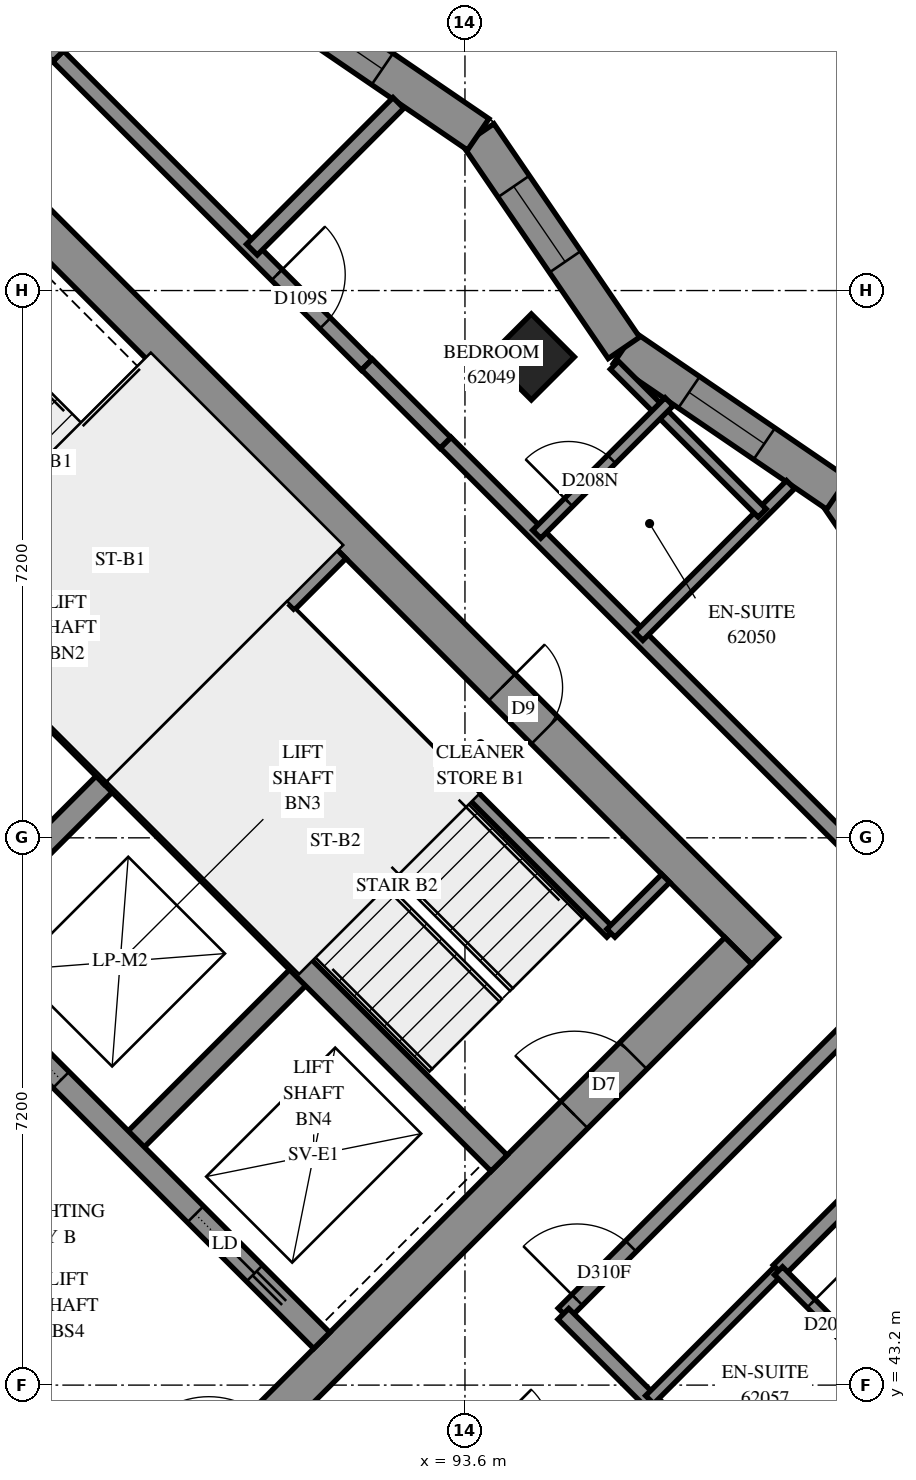
"""IFC4 building model, lengths in metres.
Left out: names, types, materials, properties, quantities, classifications, styles, units other than length and angle.
Written with IfcOpenShell. Run it as: python <this file> out.ifc"""

import sys

from ifc_helpers import new_model, si_unit, direction, frame, frame_2d, origin, origin_2d, place, context, subcontext, project, spatial, polyline, rectangle, outline, extrude, element, fill, save


model = new_model("IFC4")
c1 = context("Model", 3, precision=1e-05, world=origin(), true_north=direction((0.0, 1.0)))
c2 = subcontext(c1, "Body", "Model", "MODEL_VIEW")
j1 = project(units=[si_unit("LENGTHUNIT", "METRE"), si_unit("PLANEANGLEUNIT", "RADIAN")], contexts=[c1])
p1 = place(None, origin())
s1 = spatial("IfcSite", under=j1, at=p1, CompositionType="ELEMENT")
p2 = place(p1, origin())
s2 = spatial("IfcBuilding", under=s1, at=p2, CompositionType="ELEMENT")
p3 = place(p2, frame((0.0, 0.0, 227.0)))
s3 = spatial("IfcBuildingStorey", under=s2, at=p3, CompositionType="ELEMENT", Elevation=227.0)
p4 = place(p3, frame((94.474, 56.727, 0.0), z_axis=(0.0, 0.0, 1.0), x_axis=(0.7071067812, -0.7071067812, 0.0)))
e1 = element("IfcColumn", 1, at=p4, inside=s3, PredefinedType="COLUMN", context=c2, shape_type="SweptSolid", body=[
    extrude(rectangle(XDim=0.8, YDim=0.8, at=origin_2d()), origin(), (0.0, 0.0, 1.0), 3.1),
])
p5 = place(p3, frame((86.66, 59.802, -0.3), z_axis=(0.0, 0.0, 1.0), x_axis=(0.7071067812, -0.7071067812, 0.0)))
e2 = element("IfcWall", 2, at=p5, inside=s3, PredefinedType="SHEAR", context=c2, shape_type="SweptSolid", body=[
    extrude(rectangle(XDim=15.4, YDim=0.5, at=frame_2d((7.7, 0.0))), origin(), (0.0, 0.0, 1.0), 2.7),
])
p6 = place(p5, frame((10.5, 0.0, 0.3)))
e3 = element("IfcOpeningElement", 3, at=p6, cuts=e2, PredefinedType="OPENING", context=c2, shape_type="SweptSolid", body=[
    extrude(rectangle(XDim=0.8, YDim=2.1, at=frame_2d((0.4, 1.05))), frame((0.0, 0.26, 0.0), z_axis=(0.0, -1.0, 0.0), x_axis=(1.0, 0.0, 0.0)), (0.0, 0.0, 1.0), 0.52),
])
p7 = place(p3, frame((87.013, 38.731, -0.3), z_axis=(0.0, 0.0, 1.0), x_axis=(0.7071067812, 0.7071067812, 0.0)))
e4 = element("IfcWall", 4, at=p7, inside=s3, PredefinedType="SHEAR", context=c2, shape_type="SweptSolid", body=[
    extrude(rectangle(XDim=14.4, YDim=0.5, at=frame_2d((7.2, 0.0))), origin(), (0.0, 0.0, 1.0), 2.7),
])
p8 = place(p7, frame((4.55, 0.0, 0.3)))
e5 = element("IfcOpeningElement", 5, at=p8, cuts=e4, PredefinedType="OPENING", context=c2, shape_type="SweptSolid", body=[
    extrude(rectangle(XDim=1.1, YDim=2.1, at=frame_2d((0.55, 1.05))), frame((0.0, 0.26, 0.0), z_axis=(0.0, -1.0, 0.0), x_axis=(1.0, 0.0, 0.0)), (0.0, 0.0, 1.0), 0.52),
])
p9 = place(p7, frame((11.35, 0.0, 0.3)))
e6 = element("IfcOpeningElement", 6, at=p9, cuts=e4, PredefinedType="OPENING", context=c2, shape_type="SweptSolid", body=[
    extrude(rectangle(XDim=1.1, YDim=2.1, at=frame_2d((0.55, 1.05))), frame((0.0, 0.26, 0.0), z_axis=(0.0, -1.0, 0.0), x_axis=(1.0, 0.0, 0.0)), (0.0, 0.0, 1.0), 0.52),
])
for number, where, z_axis, x_axis in (
    (7, (86.625, 48.878, 0.0), (0.0, 0.0, 1.0), (0.707, 0.707, 0.0)),
    (8, (89.17, 46.332, 0.0), (0.0, 0.0, 1.0), (0.707, 0.707, 0.0)),
):
    element("IfcWall", number, at=place(p3, frame(where, z_axis=z_axis, x_axis=x_axis)), inside=s3, PredefinedType="SOLIDWALL", context=c2, shape_type="SweptSolid", body=[
        extrude(rectangle(XDim=3.3, YDim=0.3, at=frame_2d((1.65, 0.0))), origin(), (0.0, 0.0, 1.0), 3.1),
    ])
p10 = place(p3, frame((78.988, 51.423, 0.0), z_axis=(0.0, 0.0, 1.0), x_axis=(0.7071067812, -0.7071067812, 0.0)))
e9 = element("IfcWall", 9, at=p10, inside=s3, PredefinedType="SOLIDWALL", context=c2, shape_type="SweptSolid", body=[
    extrude(rectangle(XDim=14.4, YDim=0.3, at=frame_2d((7.2, 0.0))), origin(), (0.0, 0.0, 1.0), 3.1),
])
p11 = place(p10, frame((1.35, 0.0, 0.0)))
e10 = element("IfcOpeningElement", 10, at=p11, cuts=e9, PredefinedType="OPENING", context=c2, shape_type="SweptSolid", body=[
    extrude(rectangle(XDim=0.9, YDim=2.1, at=frame_2d((0.45, 1.05))), frame((0.0, 0.16, 0.0), z_axis=(0.0, -1.0, 0.0), x_axis=(1.0, 0.0, 0.0)), (0.0, 0.0, 1.0), 0.32),
])
p12 = place(p10, frame((4.95, 0.0, 0.0)))
e11 = element("IfcOpeningElement", 11, at=p12, cuts=e9, PredefinedType="OPENING", context=c2, shape_type="SweptSolid", body=[
    extrude(rectangle(XDim=0.9, YDim=2.1, at=frame_2d((0.45, 1.05))), frame((0.0, 0.16, 0.0), z_axis=(0.0, -1.0, 0.0), x_axis=(1.0, 0.0, 0.0)), (0.0, 0.0, 1.0), 0.32),
])
p13 = place(p10, frame((8.55, 0.0, 0.0)))
e12 = element("IfcOpeningElement", 12, at=p13, cuts=e9, PredefinedType="OPENING", context=c2, shape_type="SweptSolid", body=[
    extrude(rectangle(XDim=0.9, YDim=2.1, at=frame_2d((0.45, 1.05))), frame((0.0, 0.16, 0.0), z_axis=(0.0, -1.0, 0.0), x_axis=(1.0, 0.0, 0.0)), (0.0, 0.0, 1.0), 0.32),
])
p14 = place(p10, frame((12.05, 0.0, 0.0)))
e13 = element("IfcOpeningElement", 13, at=p14, cuts=e9, PredefinedType="OPENING", context=c2, shape_type="SweptSolid", body=[
    extrude(rectangle(XDim=1.1, YDim=2.1, at=frame_2d((0.55, 1.05))), frame((0.0, 0.16, 0.0), z_axis=(0.0, -1.0, 0.0), x_axis=(1.0, 0.0, 0.0)), (0.0, 0.0, 1.0), 0.32),
])
p15 = place(p3, frame((81.534, 53.969, 0.0), z_axis=(0.0, 0.0, 1.0), x_axis=(0.707103309, -0.7071102534, 0.0)))
e14 = element("IfcWall", 14, at=p15, inside=s3, PredefinedType="SOLIDWALL", context=c2, shape_type="SweptSolid", body=[
    extrude(rectangle(XDim=14.4, YDim=0.3, at=frame_2d((7.2, 0.0))), origin(), (0.0, 0.0, 1.0), 3.1),
])
p16 = place(p15, frame((1.25, 0.0, 0.0)))
e15 = element("IfcOpeningElement", 15, at=p16, cuts=e14, PredefinedType="OPENING", context=c2, shape_type="SweptSolid", body=[
    extrude(rectangle(XDim=1.1, YDim=2.1, at=frame_2d((0.55, 1.05))), frame((0.0, 0.16, 0.0), z_axis=(0.0, -1.0, 0.0), x_axis=(1.0, 0.0, 0.0)), (0.0, 0.0, 1.0), 0.32),
])
p17 = place(p15, frame((4.85, 0.0, 0.0)))
e16 = element("IfcOpeningElement", 16, at=p17, cuts=e14, PredefinedType="OPENING", context=c2, shape_type="SweptSolid", body=[
    extrude(rectangle(XDim=1.1, YDim=2.1, at=frame_2d((0.55, 1.05))), frame((0.0, 0.16, 0.0), z_axis=(0.0, -1.0, 0.0), x_axis=(1.0, 0.0, 0.0)), (0.0, 0.0, 1.0), 0.32),
])
p18 = place(p15, frame((8.45, 0.0, 0.0)))
e17 = element("IfcOpeningElement", 17, at=p18, cuts=e14, PredefinedType="OPENING", context=c2, shape_type="SweptSolid", body=[
    extrude(rectangle(XDim=1.1, YDim=2.1, at=frame_2d((0.55, 1.05))), frame((0.0, 0.16, 0.0), z_axis=(0.0, -1.0, 0.0), x_axis=(1.0, 0.0, 0.0)), (0.0, 0.0, 1.0), 0.32),
])
p19 = place(p15, frame((12.05, 0.0, 0.0)))
e18 = element("IfcOpeningElement", 18, at=p19, cuts=e14, PredefinedType="OPENING", context=c2, shape_type="SweptSolid", body=[
    extrude(rectangle(XDim=1.1, YDim=2.1, at=frame_2d((0.55, 1.05))), frame((0.0, 0.16, 0.0), z_axis=(0.0, -1.0, 0.0), x_axis=(1.0, 0.0, 0.0)), (0.0, 0.0, 1.0), 0.32),
])
for number, where, z_axis, x_axis in (
    (19, (83.867, 56.302, 0.0), (0.0, 0.0, 1.0), (0.707, -0.707, 0.0)),
    (20, (88.958, 51.211, 0.0), (0.0, 0.0, 1.0), (0.707, -0.707, 0.0)),
):
    element("IfcWall", number, at=place(p3, frame(where, z_axis=z_axis, x_axis=x_axis)), inside=s3, PredefinedType="SOLIDWALL", context=c2, shape_type="SweptSolid", body=[
        extrude(rectangle(XDim=7.2, YDim=0.3, at=frame_2d((3.6, 0.0))), origin(), (0.0, 0.0, 1.0), 3.1),
    ])
p20 = place(p3, frame((88.958, 51.211, 0.0), z_axis=(0.0, 0.0, 1.0), x_axis=(0.7071067812, 0.7071067812, 0.0)))
e21 = element("IfcWall", 21, at=p20, inside=s3, PredefinedType="SOLIDWALL", context=c2, shape_type="SweptSolid", body=[
    extrude(rectangle(XDim=4.2, YDim=0.3, at=frame_2d((2.1, 0.0))), origin(), (0.0, 0.0, 1.0), 3.1),
])
p21 = place(p3, frame((100.429, 52.103, 0.0), z_axis=(0.0, 0.0, 1.0), x_axis=(-0.563838178, 0.8258852881, 0.0)))
e22 = element("IfcWall", 22, at=p21, inside=s3, PredefinedType="SOLIDWALL", context=c2, shape_type="SweptSolid", body=[
    extrude(outline(polyline([(0.069, -0.25), (3.469, -0.25), (3.375, 0.25), (-0.069, 0.25), (0.069, -0.25)])), origin(), (0.0, 0.0, 1.0), 3.1),
])
p22 = place(p21, frame((1.087, 0.0, 0.45)))
e23 = element("IfcOpeningElement", 23, at=p22, cuts=e22, PredefinedType="OPENING", context=c2, shape_type="SweptSolid", body=[
    extrude(rectangle(XDim=1.2, YDim=2.5, at=frame_2d((0.6, 1.25))), frame((0.0, 0.26, 0.0), z_axis=(0.0, -1.0, 0.0), x_axis=(1.0, 0.0, 0.0)), (0.0, 0.0, 1.0), 0.52),
])
p23 = place(p3, frame((98.499, 54.929, 0.0), z_axis=(0.0, 0.0, 1.0), x_axis=(-0.8258911763, 0.5638295531, 0.0)))
e24 = element("IfcWall", 24, at=p23, inside=s3, PredefinedType="SOLIDWALL", context=c2, shape_type="SweptSolid", body=[
    extrude(outline(polyline([(-0.047, -0.25), (3.353, -0.25), (3.447, 0.25), (0.047, 0.25), (-0.047, -0.25)])), origin(), (0.0, 0.0, 1.0), 3.1),
])
p24 = place(p23, frame((1.163, 0.0, 0.45)))
e25 = element("IfcOpeningElement", 25, at=p24, cuts=e24, PredefinedType="OPENING", context=c2, shape_type="SweptSolid", body=[
    extrude(rectangle(XDim=1.2, YDim=2.5, at=frame_2d((0.6, 1.25))), frame((0.0, 0.26, 0.0), z_axis=(0.0, -1.0, 0.0), x_axis=(1.0, 0.0, 0.0)), (0.0, 0.0, 1.0), 0.52),
])
p25 = place(p3, frame((95.691, 56.846, 0.0), z_axis=(0.0, 0.0, 1.0), x_axis=(-0.5638295531, 0.8258911763, 0.0)))
e26 = element("IfcWall", 26, at=p25, inside=s3, PredefinedType="SOLIDWALL", context=c2, shape_type="SweptSolid", body=[
    extrude(outline(polyline([(0.047, -0.25), (3.447, -0.25), (3.353, 0.25), (-0.047, 0.25), (0.047, -0.25)])), origin(), (0.0, 0.0, 1.0), 3.1),
])
p26 = place(p25, frame((1.372, 0.0, 0.45)))
e27 = element("IfcOpeningElement", 27, at=p26, cuts=e26, PredefinedType="OPENING", context=c2, shape_type="SweptSolid", body=[
    extrude(rectangle(XDim=1.2, YDim=2.5, at=frame_2d((0.6, 1.25))), frame((0.0, 0.26, 0.0), z_axis=(0.0, -1.0, 0.0), x_axis=(1.0, 0.0, 0.0)), (0.0, 0.0, 1.0), 0.52),
])
p27 = place(p3, frame((93.774, 59.654, 0.0), z_axis=(0.0, 0.0, 1.0), x_axis=(-0.8258911763, 0.5638295531, 0.0)))
e28 = element("IfcWall", 28, at=p27, inside=s3, PredefinedType="SOLIDWALL", context=c2, shape_type="SweptSolid", body=[
    extrude(outline(polyline([(-0.047, -0.25), (3.353, -0.25), (3.447, 0.25), (0.047, 0.25), (-0.047, -0.25)])), origin(), (0.0, 0.0, 1.0), 3.1),
])
p28 = place(p27, frame((1.527, 0.0, 0.45)))
e29 = element("IfcOpeningElement", 29, at=p28, cuts=e28, PredefinedType="OPENING", context=c2, shape_type="SweptSolid", body=[
    extrude(rectangle(XDim=1.2, YDim=2.5, at=frame_2d((0.6, 1.25))), frame((0.0, 0.26, 0.0), z_axis=(0.0, -1.0, 0.0), x_axis=(1.0, 0.0, 0.0)), (0.0, 0.0, 1.0), 0.52),
])
p29 = place(p3, frame((91.313, 53.354, 0.0), z_axis=(0.0, 0.0, 1.0), x_axis=(0.7071067812, -0.7071067812, 0.0)))
e30 = element("IfcWall", 30, at=p29, inside=s3, PredefinedType="PARTITIONING", context=c2, shape_type="SweptSolid", body=[
    extrude(rectangle(XDim=5.95, YDim=0.15, at=frame_2d((2.975, 0.0))), origin(), (0.0, 0.0, 1.0), 3.1),
])
p30 = place(p3, frame((95.52, 49.146, 0.0), z_axis=(0.0, 0.0, 1.0), x_axis=(0.7071067812, 0.7071067812, 0.0)))
e31 = element("IfcWall", 31, at=p30, inside=s3, PredefinedType="PARTITIONING", context=c2, shape_type="SweptSolid", body=[
    extrude(rectangle(XDim=1.02, YDim=0.15, at=frame_2d((0.51, 0.0))), origin(), (0.0, 0.0, 1.0), 3.1),
])
p31 = place(p3, frame((93.346, 55.599, 0.0), z_axis=(0.0, 0.0, 1.0), x_axis=(0.7071067812, -0.7071067812, 0.0)))
e32 = element("IfcWall", 32, at=p31, inside=s3, PredefinedType="PARTITIONING", context=c2, shape_type="SweptSolid", body=[
    extrude(rectangle(XDim=9.201, YDim=0.2, at=frame_2d((4.601, 0.0))), origin(), (0.0, 0.0, 1.0), 3.1),
])
p32 = place(p3, frame((94.897, 44.141, 0.0), z_axis=(0.0, 0.0, 1.0), x_axis=(0.7071067812, 0.7071067812, 0.0)))
e33 = element("IfcWall", 33, at=p32, inside=s3, PredefinedType="PARTITIONING", context=c2, shape_type="SweptSolid", body=[
    extrude(rectangle(XDim=7.0, YDim=0.2, at=frame_2d((3.5, 0.0))), origin(), (0.0, 0.0, 1.0), 3.1),
])
p33 = place(p32, frame((0.253, 0.0, 0.0)))
e34 = element("IfcOpeningElement", 34, at=p33, cuts=e33, PredefinedType="OPENING", context=c2, shape_type="SweptSolid", body=[
    extrude(rectangle(XDim=1.0, YDim=2.1, at=frame_2d((0.5, 1.05))), frame((0.0, 0.11, 0.0), z_axis=(0.0, -1.0, 0.0), x_axis=(1.0, 0.0, 0.0)), (0.0, 0.0, 1.0), 0.22),
])
p34 = place(p3, frame((88.247, 60.683, 0.0), z_axis=(0.0, 0.0, 1.0), x_axis=(0.7071067812, -0.7071067812, 0.0)))
e35 = element("IfcWall", 35, at=p34, inside=s3, PredefinedType="PARTITIONING", context=c2, shape_type="SweptSolid", body=[
    extrude(rectangle(XDim=5.742, YDim=0.2, at=frame_2d((2.871, 0.0))), origin(), (0.0, 0.0, 1.0), 3.1),
])
p35 = place(p34, frame((4.069, 0.0, 0.0)))
e36 = element("IfcOpeningElement", 36, at=p35, cuts=e35, PredefinedType="OPENING", context=c2, shape_type="SweptSolid", body=[
    extrude(rectangle(XDim=0.9, YDim=2.1, at=frame_2d((0.45, 1.05))), frame((0.0, 0.11, 0.0), z_axis=(0.0, -1.0, 0.0), x_axis=(1.0, 0.0, 0.0)), (0.0, 0.0, 1.0), 0.22),
])
p36 = place(p3, frame((94.895, 44.137, 0.0), z_axis=(0.0, 0.0, 1.0), x_axis=(0.7071067812, -0.7071067812, 0.0)))
e37 = element("IfcWall", 37, at=p36, inside=s3, PredefinedType="PARTITIONING", context=c2, shape_type="SweptSolid", body=[
    extrude(rectangle(XDim=5.199, YDim=0.2, at=frame_2d((2.599, 0.0))), origin(), (0.0, 0.0, 1.0), 3.1),
])
p37 = place(p36, frame((3.898, 0.0, 0.0)))
e38 = element("IfcOpeningElement", 38, at=p37, cuts=e37, PredefinedType="OPENING", context=c2, shape_type="SweptSolid", body=[
    extrude(rectangle(XDim=0.9, YDim=2.1, at=frame_2d((0.45, 1.05))), frame((0.0, 0.11, 0.0), z_axis=(0.0, -1.0, 0.0), x_axis=(1.0, 0.0, 0.0)), (0.0, 0.0, 1.0), 0.22),
])
p38 = place(p3, frame((95.887, 53.051, 0.0), z_axis=(0.0, 0.0, 1.0), x_axis=(0.7070890683, 0.7071244936, 0.0)))
e39 = element("IfcWall", 39, at=p38, inside=s3, PredefinedType="PARTITIONING", context=c2, shape_type="SweptSolid", body=[
    extrude(rectangle(XDim=2.823, YDim=0.15, at=frame_2d((1.411, 0.0))), origin(), (0.0, 0.0, 1.0), 3.1),
])
p39 = place(p3, frame((95.566, 56.618, 0.0), z_axis=(0.0, 0.0, 1.0), x_axis=(0.7071067812, -0.7071067812, 0.0)))
e40 = element("IfcWall", 40, at=p39, inside=s3, PredefinedType="PARTITIONING", context=c2, shape_type="SweptSolid", body=[
    extrude(rectangle(XDim=2.751, YDim=0.15, at=frame_2d((1.375, 0.0))), origin(), (0.0, 0.0, 1.0), 3.1),
])
p40 = place(p3, frame((90.797, 58.139, 0.0), z_axis=(0.0, 0.0, 1.0), x_axis=(0.7066482226, 0.7075650426, 0.0)))
e41 = element("IfcWall", 41, at=p40, inside=s3, PredefinedType="PARTITIONING", context=c2, shape_type="SweptSolid", body=[
    extrude(rectangle(XDim=2.727, YDim=0.2, at=frame_2d((1.363, 0.0))), origin(), (0.0, 0.0, 1.0), 3.1),
])
p41 = place(p3, frame((94.544, 54.394, 0.0), z_axis=(0.0, 0.0, 1.0), x_axis=(0.7071067812, 0.7071067812, 0.0)))
e42 = element("IfcWall", 42, at=p41, inside=s3, PredefinedType="PARTITIONING", context=c2, shape_type="SweptSolid", body=[
    extrude(rectangle(XDim=2.465, YDim=0.15, at=frame_2d((1.232, 0.0))), origin(), (0.0, 0.0, 1.0), 3.1),
])
p42 = place(p41, frame((0.594, 0.0, 0.0)))
e43 = element("IfcOpeningElement", 43, at=p42, cuts=e42, PredefinedType="OPENING", context=c2, shape_type="SweptSolid", body=[
    extrude(rectangle(XDim=0.8, YDim=2.1, at=frame_2d((0.4, 1.05))), frame((0.0, 0.085, 0.0), z_axis=(0.0, -1.0, 0.0), x_axis=(1.0, 0.0, 0.0)), (0.0, 0.0, 1.0), 0.17),
])
for number, where, z_axis, x_axis in (
    (44, (97.371, 41.667, 0.0), (0.0, 0.0, 1.0), (0.708, 0.707, 0.0)),
    (45, (96.03, 43.008, 0.0), (0.0, 0.0, 1.0), (0.707, 0.708, 0.0)),
):
    element("IfcWall", number, at=place(p3, frame(where, z_axis=z_axis, x_axis=x_axis)), inside=s3, PredefinedType="PARTITIONING", context=c2, shape_type="SweptSolid", body=[
        extrude(rectangle(XDim=2.4, YDim=0.15, at=frame_2d((1.2, 0.0))), origin(), (0.0, 0.0, 1.0), 3.1),
    ])
p43 = place(p3, frame((97.726, 44.708, 0.0), z_axis=(0.0, 0.0, 1.0), x_axis=(0.7071067812, 0.7071067812, 0.0)))
e46 = element("IfcWall", 46, at=p43, inside=s3, PredefinedType="PARTITIONING", context=c2, shape_type="SweptSolid", body=[
    extrude(rectangle(XDim=2.099, YDim=0.2, at=frame_2d((1.049, 0.0))), origin(), (0.0, 0.0, 1.0), 3.1),
])
p44 = place(p3, frame((97.725, 44.703, 0.0), z_axis=(0.0, 0.0, 1.0), x_axis=(0.7065800724, -0.7076330979, 0.0)))
e47 = element("IfcWall", 47, at=p44, inside=s3, PredefinedType="PARTITIONING", context=c2, shape_type="SweptSolid", body=[
    extrude(rectangle(XDim=1.899, YDim=0.15, at=frame_2d((0.95, 0.0))), origin(), (0.0, 0.0, 1.0), 3.1),
])
p45 = place(p44, frame((0.608, 0.0, 0.0)))
e48 = element("IfcOpeningElement", 48, at=p45, cuts=e47, PredefinedType="OPENING", context=c2, shape_type="SweptSolid", body=[
    extrude(rectangle(XDim=0.8, YDim=2.1, at=frame_2d((0.4, 1.05))), frame((0.0, 0.085, 0.0), z_axis=(0.0, -1.0, 0.0), x_axis=(1.0, 0.0, 0.0)), (0.0, 0.0, 1.0), 0.17),
])
p46 = place(p3, frame((92.311, 56.627, 0.0), z_axis=(0.0, 0.0, 1.0), x_axis=(0.7077922938, -0.7064206033, 0.0)))
e49 = element("IfcWall", 49, at=p46, inside=s3, PredefinedType="PARTITIONING", context=c2, shape_type="SweptSolid", body=[
    extrude(rectangle(XDim=1.458, YDim=0.2, at=frame_2d((0.729, 0.0))), origin(), (0.0, 0.0, 1.0), 3.1),
])
p47 = place(p3, frame((87.899, 61.041, 0.0), z_axis=(0.0, 0.0, 1.0), x_axis=(0.7051008166, -0.7091070712, 0.0)))
e50 = element("IfcWall", 50, at=p47, inside=s3, PredefinedType="PARTITIONING", context=c2, shape_type="SweptSolid", body=[
    extrude(rectangle(XDim=0.499, YDim=0.2, at=frame_2d((0.25, 0.0))), origin(), (0.0, 0.0, 1.0), 3.1),
])
p48 = place(p24, origin())
e51 = element("IfcWindow", 51, at=p48, inside=s3, PartitioningType="SINGLE_PANEL", PredefinedType="WINDOW", context=c2, shape_type="SweptSolid", body=[
    extrude(rectangle(XDim=1.2, YDim=2.5, at=frame_2d((0.6, 1.25))), frame((0.0, 0.18, 0.0), z_axis=(0.0, -1.0, 0.0), x_axis=(1.0, 0.0, 0.0)), (0.0, 0.0, 1.0), 0.06),
])
fill(e25, e51)
p49 = place(p26, origin())
e52 = element("IfcWindow", 52, at=p49, inside=s3, PartitioningType="SINGLE_PANEL", PredefinedType="WINDOW", context=c2, shape_type="SweptSolid", body=[
    extrude(rectangle(XDim=1.2, YDim=2.5, at=frame_2d((0.6, 1.25))), frame((0.0, 0.18, 0.0), z_axis=(0.0, -1.0, 0.0), x_axis=(1.0, 0.0, 0.0)), (0.0, 0.0, 1.0), 0.06),
])
fill(e27, e52)
p50 = place(p28, origin())
e53 = element("IfcWindow", 53, at=p50, inside=s3, PartitioningType="SINGLE_PANEL", PredefinedType="WINDOW", context=c2, shape_type="SweptSolid", body=[
    extrude(rectangle(XDim=1.2, YDim=2.5, at=frame_2d((0.6, 1.25))), frame((0.0, 0.18, 0.0), z_axis=(0.0, -1.0, 0.0), x_axis=(1.0, 0.0, 0.0)), (0.0, 0.0, 1.0), 0.06),
])
fill(e29, e53)
p51 = place(p6, origin())
e54 = element("IfcDoor", 54, at=p51, inside=s3, OperationType="SINGLE_SWING_RIGHT", PredefinedType="DOOR", context=c2, shape_type="SweptSolid", body=[
    extrude(rectangle(XDim=0.8, YDim=2.1, at=frame_2d((0.4, 1.05))), frame((0.0, 0.025, 0.0), z_axis=(0.0, -1.0, 0.0), x_axis=(1.0, 0.0, 0.0)), (0.0, 0.0, 1.0), 0.05),
])
fill(e3, e54)
p52 = place(p9, origin())
e55 = element("IfcDoor", 55, at=p52, inside=s3, OperationType="SINGLE_SWING_RIGHT", PredefinedType="DOOR", context=c2, shape_type="SweptSolid", body=[
    extrude(rectangle(XDim=1.1, YDim=2.1, at=frame_2d((0.55, 1.05))), frame((0.0, 0.025, 0.0), z_axis=(0.0, -1.0, 0.0), x_axis=(1.0, 0.0, 0.0)), (0.0, 0.0, 1.0), 0.05),
])
fill(e6, e55)
p53 = place(p18, origin())
e56 = element("IfcDoor", 56, at=p53, inside=s3, OperationType="SLIDING_TO_LEFT", PredefinedType="DOOR", context=c2, shape_type="SweptSolid", body=[
    extrude(rectangle(XDim=1.1, YDim=2.1, at=frame_2d((0.55, 1.05))), frame((0.0, 0.025, 0.0), z_axis=(0.0, -1.0, 0.0), x_axis=(1.0, 0.0, 0.0)), (0.0, 0.0, 1.0), 0.05),
])
fill(e17, e56)
p54 = place(p19, origin())
e57 = element("IfcDoor", 57, at=p54, inside=s3, OperationType="SLIDING_TO_RIGHT", PredefinedType="DOOR", context=c2, shape_type="SweptSolid", body=[
    extrude(rectangle(XDim=1.1, YDim=2.1, at=frame_2d((0.55, 1.05))), frame((0.0, 0.025, 0.0), z_axis=(0.0, -1.0, 0.0), x_axis=(1.0, 0.0, 0.0)), (0.0, 0.0, 1.0), 0.05),
])
fill(e18, e57)
p55 = place(p33, origin())
e58 = element("IfcDoor", 58, at=p55, inside=s3, OperationType="SINGLE_SWING_RIGHT", PredefinedType="DOOR", context=c2, shape_type="SweptSolid", body=[
    extrude(rectangle(XDim=1.0, YDim=2.1, at=frame_2d((0.5, 1.05))), frame((0.0, 0.025, 0.0), z_axis=(0.0, -1.0, 0.0), x_axis=(1.0, 0.0, 0.0)), (0.0, 0.0, 1.0), 0.05),
])
fill(e34, e58)
p56 = place(p35, origin())
e59 = element("IfcDoor", 59, at=p56, inside=s3, OperationType="SINGLE_SWING_RIGHT", PredefinedType="DOOR", context=c2, shape_type="SweptSolid", body=[
    extrude(rectangle(XDim=0.9, YDim=2.1, at=frame_2d((0.45, 1.05))), frame((0.0, 0.025, 0.0), z_axis=(0.0, -1.0, 0.0), x_axis=(1.0, 0.0, 0.0)), (0.0, 0.0, 1.0), 0.05),
])
fill(e36, e59)
p57 = place(p42, origin())
e60 = element("IfcDoor", 60, at=p57, inside=s3, OperationType="SINGLE_SWING_RIGHT", PredefinedType="DOOR", context=c2, shape_type="SweptSolid", body=[
    extrude(rectangle(XDim=0.8, YDim=2.1, at=frame_2d((0.4, 1.05))), frame((0.0, 0.025, 0.0), z_axis=(0.0, -1.0, 0.0), x_axis=(1.0, 0.0, 0.0)), (0.0, 0.0, 1.0), 0.05),
])
fill(e43, e60)
p58 = place(p45, origin())
e61 = element("IfcDoor", 61, at=p58, inside=s3, OperationType="SINGLE_SWING_RIGHT", PredefinedType="DOOR", context=c2, shape_type="SweptSolid", body=[
    extrude(rectangle(XDim=0.8, YDim=2.1, at=frame_2d((0.4, 1.05))), frame((0.0, 0.025, 0.0), z_axis=(0.0, -1.0, 0.0), x_axis=(1.0, 0.0, 0.0)), (0.0, 0.0, 1.0), 0.05),
])
fill(e48, e61)
save(model, sys.argv[1])
